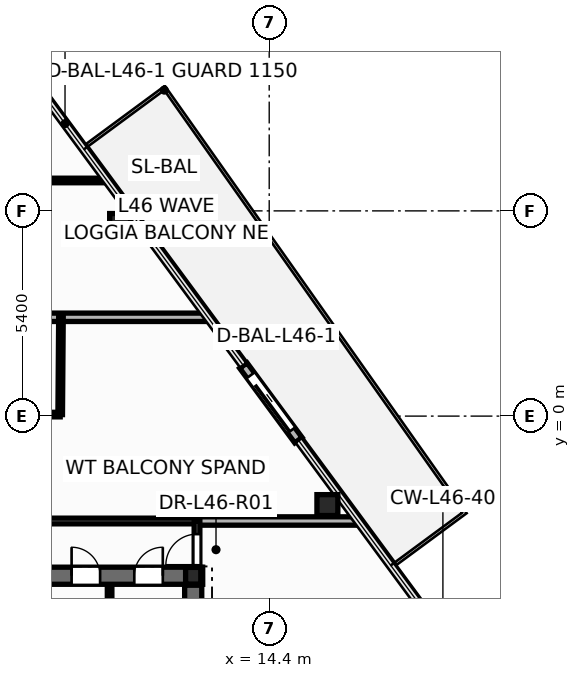
"""IFC4 building model, lengths in metres.
Left out: names, types, materials, properties, quantities, classifications, styles, units other than length and angle.
Written with IfcOpenShell. Run it as: python <this file> out.ifc"""

import sys

from ifc_helpers import new_model, si_unit, direction, frame, frame_2d, origin, origin_2d, place, context, subcontext, project, spatial, rectangle, hollow_circle, i_section, extrude, element, fill, save


model = new_model("IFC4")
c1 = context("Model", 3, precision=1e-05, world=origin(), true_north=direction((0.0, 1.0)))
c2 = subcontext(c1, "Body", "Model", "MODEL_VIEW")
j1 = project(units=[si_unit("LENGTHUNIT", "METRE"), si_unit("PLANEANGLEUNIT", "RADIAN")], contexts=[c1])
p1 = place(None, origin())
s1 = spatial("IfcSite", under=j1, at=p1, CompositionType="ELEMENT")
p2 = place(p1, origin())
s2 = spatial("IfcBuilding", under=s1, at=p2, CompositionType="ELEMENT")
p3 = place(p2, frame((0.0, 0.0, 178.5)))
s3 = spatial("IfcBuildingStorey", under=s2, at=p3, CompositionType="ELEMENT", Elevation=178.5)
for number, where, z_axis, x_axis in (
    (1, (15.931, -2.341, 0.0), (0.0, 0.0, 1.0), (1.0, 0.0, 0.0)),
    (2, (10.477, 5.055, 0.0), (0.0, 0.0, 1.0), (1.0, 0.0, 0.0)),
):
    element("IfcColumn", number, at=place(p3, frame(where, z_axis=z_axis, x_axis=x_axis)), inside=s3, PredefinedType="COLUMN", context=c2, shape_type="SweptSolid", body=[
        extrude(hollow_circle(Radius=0.275, WallThickness=0.024, at=origin_2d()), origin(), (0.0, 0.0, 1.0), 3.6),
    ])
p4 = place(p3, frame((12.4, -4.2, 0.0), z_axis=(0.0, 0.0, 1.0), x_axis=(1.0, 0.0, 0.0)))
e3 = element("IfcColumn", 3, at=p4, inside=s3, PredefinedType="COLUMN", context=c2, shape_type="SweptSolid", body=[
    extrude(i_section(OverallWidth=0.4, OverallDepth=0.44, WebThickness=0.028, FlangeThickness=0.04, at=origin_2d()), origin(), (0.0, 0.0, 1.0), 3.6),
])
p5 = place(p3, frame((15.168, -0.633, -0.015), z_axis=(0.0, 0.0, 1.0), x_axis=(-0.593448168385, 0.804872208142, 0.0)))
e4 = element("IfcWall", 4, at=p5, inside=s3, PredefinedType="STANDARD", context=c2, shape_type="SweptSolid", body=[
    extrude(rectangle(XDim=2.44, YDim=0.24, at=frame_2d((1.22, 0.0))), origin(), (0.0, 0.0, 1.0), 2.807),
])
p6 = place(p5, frame((0.32, 0.0, 0.015)))
e5 = element("IfcOpeningElement", 5, at=p6, cuts=e4, PredefinedType="OPENING", context=c2, shape_type="SweptSolid", body=[
    extrude(rectangle(XDim=1.806, YDim=2.204, at=frame_2d((0.9, 1.102))), frame((0.0, 0.13, 0.0), z_axis=(0.0, -1.0, 0.0), x_axis=(1.0, 0.0, 0.0)), (0.0, 0.0, 1.0), 0.26),
])
p7 = place(p3, frame((10.2, -5.52, 0.0), z_axis=(0.0, 0.0, 1.0), x_axis=(0.0, 1.0, 0.0)))
e6 = element("IfcWall", 6, at=p7, inside=s3, PredefinedType="PARTITIONING", context=c2, shape_type="SweptSolid", body=[
    extrude(rectangle(XDim=1.12, YDim=0.12, at=frame_2d((0.56, 0.0))), origin(), (0.0, 0.0, 1.0), 3.35),
])
p8 = place(p3, frame((-12.65, -4.2, 0.0), z_axis=(0.0, 0.0, 1.0), x_axis=(1.0, 0.0, 0.0)))
e7 = element("IfcWall", 7, at=p8, inside=s3, PredefinedType="SHEAR", context=c2, shape_type="SweptSolid", body=[
    extrude(rectangle(XDim=25.3, YDim=0.45, at=frame_2d((12.65, 0.0))), origin(), (0.0, 0.0, 1.0), 3.6),
])
p9 = place(p8, frame((1.85, 0.0, 0.0)))
e8 = element("IfcOpeningElement", 8, at=p9, cuts=e7, PredefinedType="OPENING", context=c2, shape_type="SweptSolid", body=[
    extrude(rectangle(XDim=0.756, YDim=2.054, at=frame_2d((0.375, 1.027))), frame((0.0, 0.235, 0.0), z_axis=(0.0, -1.0, 0.0), x_axis=(1.0, 0.0, 0.0)), (0.0, 0.0, 1.0), 0.47),
])
p10 = place(p8, frame((21.85, 0.0, 0.0)))
e9 = element("IfcOpeningElement", 9, at=p10, cuts=e7, PredefinedType="OPENING", context=c2, shape_type="SweptSolid", body=[
    extrude(rectangle(XDim=0.756, YDim=2.054, at=frame_2d((0.375, 1.027))), frame((0.0, 0.235, 0.0), z_axis=(0.0, -1.0, 0.0), x_axis=(1.0, 0.0, 0.0)), (0.0, 0.0, 1.0), 0.47),
])
p11 = place(p8, frame((23.5, 0.0, 0.0)))
e10 = element("IfcOpeningElement", 10, at=p11, cuts=e7, PredefinedType="OPENING", context=c2, shape_type="SweptSolid", body=[
    extrude(rectangle(XDim=0.756, YDim=2.054, at=frame_2d((0.375, 1.027))), frame((0.0, 0.235, 0.0), z_axis=(0.0, -1.0, 0.0), x_axis=(1.0, 0.0, 0.0)), (0.0, 0.0, 1.0), 0.47),
])
p12 = place(p8, frame((5.85, 0.0, 0.0)))
e11 = element("IfcOpeningElement", 11, at=p12, cuts=e7, PredefinedType="OPENING", context=c2, shape_type="SweptSolid", body=[
    extrude(rectangle(XDim=1.006, YDim=2.104, at=frame_2d((0.5, 1.052))), frame((0.0, 0.235, 0.0), z_axis=(0.0, -1.0, 0.0), x_axis=(1.0, 0.0, 0.0)), (0.0, 0.0, 1.0), 0.47),
])
p13 = place(p8, frame((10.35, 0.0, 0.0)))
e12 = element("IfcOpeningElement", 12, at=p13, cuts=e7, PredefinedType="OPENING", context=c2, shape_type="SweptSolid", body=[
    extrude(rectangle(XDim=1.406, YDim=2.154, at=frame_2d((0.7, 1.077))), frame((0.0, 0.235, 0.0), z_axis=(0.0, -1.0, 0.0), x_axis=(1.0, 0.0, 0.0)), (0.0, 0.0, 1.0), 0.47),
])
p14 = place(p8, frame((18.45, 0.0, 0.0)))
e13 = element("IfcOpeningElement", 13, at=p14, cuts=e7, PredefinedType="OPENING", context=c2, shape_type="SweptSolid", body=[
    extrude(rectangle(XDim=1.006, YDim=2.104, at=frame_2d((0.5, 1.052))), frame((0.0, 0.235, 0.0), z_axis=(0.0, -1.0, 0.0), x_axis=(1.0, 0.0, 0.0)), (0.0, 0.0, 1.0), 0.47),
])
p15 = place(p3, frame((12.4, -13.85, 0.0), z_axis=(0.0, 0.0, 1.0), x_axis=(0.0, 1.0, 0.0)))
e14 = element("IfcWall", 14, at=p15, inside=s3, PredefinedType="SHEAR", context=c2, shape_type="SweptSolid", body=[
    extrude(rectangle(XDim=9.4, YDim=0.45, at=frame_2d((4.7, 0.0))), origin(), (0.0, 0.0, 1.0), 3.6),
])
p16 = place(p3, frame((-0.64, 6.2, 0.0), z_axis=(0.0, 0.0, 1.0), x_axis=(1.0, 0.0, 0.0)))
e15 = element("IfcWall", 15, at=p16, inside=s3, PredefinedType="PARTITIONING", context=c2, shape_type="SweptSolid", body=[
    extrude(rectangle(XDim=10.769, YDim=0.12, at=frame_2d((5.385, 0.0))), origin(), (0.0, 0.0, 1.0), 2.325),
])
p17 = place(p3, frame((1.9, -2.76, 0.0), z_axis=(0.0, 0.0, 1.0), x_axis=(1.0, 0.0, 0.0)))
e16 = element("IfcWall", 16, at=p17, inside=s3, PredefinedType="PARTITIONING", context=c2, shape_type="SweptSolid", body=[
    extrude(rectangle(XDim=10.6, YDim=0.15, at=frame_2d((5.3, 0.0))), origin(), (0.0, 0.0, 1.0), 2.325),
])
p18 = place(p17, frame((0.399, 0.0, 0.0)))
e17 = element("IfcOpeningElement", 17, at=p18, cuts=e16, PredefinedType="OPENING", context=c2, shape_type="SweptSolid", body=[
    extrude(rectangle(XDim=0.956, YDim=2.104, at=frame_2d((0.475, 1.052))), frame((0.0, 0.085, 0.0), z_axis=(0.0, -1.0, 0.0), x_axis=(1.0, 0.0, 0.0)), (0.0, 0.0, 1.0), 0.17),
])
p19 = place(p3, frame((-0.64, 2.6, 0.0), z_axis=(0.0, 0.0, 1.0), x_axis=(1.0, 0.0, 0.0)))
e18 = element("IfcWall", 18, at=p19, inside=s3, PredefinedType="PARTITIONING", context=c2, shape_type="SweptSolid", body=[
    extrude(rectangle(XDim=13.424, YDim=0.22, at=frame_2d((6.712, 0.0))), origin(), (0.0, 0.0, 1.0), 2.325),
])
p20 = place(p3, frame((1.96, 0.04, 0.0), z_axis=(0.0, 0.0, 1.0), x_axis=(1.0, 0.0, 0.0)))
e19 = element("IfcWall", 19, at=p20, inside=s3, PredefinedType="PARTITIONING", context=c2, shape_type="SweptSolid", body=[
    extrude(rectangle(XDim=6.94, YDim=0.12, at=frame_2d((3.47, 0.0))), origin(), (0.0, 0.0, 1.0), 2.325),
])
p21 = place(p20, frame((0.359, 0.0, 0.0)))
e20 = element("IfcOpeningElement", 20, at=p21, cuts=e19, PredefinedType="OPENING", context=c2, shape_type="SweptSolid", body=[
    extrude(rectangle(XDim=0.926, YDim=2.104, at=frame_2d((0.46, 1.052))), frame((0.0, 0.07, 0.0), z_axis=(0.0, -1.0, 0.0), x_axis=(1.0, 0.0, 0.0)), (0.0, 0.0, 1.0), 0.14),
])
p22 = place(p3, frame((12.5, -2.76, 0.0), z_axis=(0.0, 0.0, 1.0), x_axis=(1.0, 0.0, 0.0)))
e21 = element("IfcWall", 21, at=p22, inside=s3, PredefinedType="PARTITIONING", context=c2, shape_type="SweptSolid", body=[
    extrude(rectangle(XDim=4.237, YDim=0.22, at=frame_2d((2.118, 0.0))), origin(), (0.0, 0.0, 1.0), 2.792),
])
p23 = place(p3, frame((8.9, 0.04, 0.0), z_axis=(0.0, 0.0, 1.0), x_axis=(0.00781971132, 0.99996942559, 0.0)))
e22 = element("IfcWall", 22, at=p23, inside=s3, PredefinedType="PARTITIONING", context=c2, shape_type="SweptSolid", body=[
    extrude(rectangle(XDim=2.56, YDim=0.12, at=frame_2d((1.28, 0.0))), origin(), (0.0, 0.0, 1.0), 2.625),
])
p24 = place(p3, frame((12.5, -4.24, 0.0), z_axis=(0.0, 0.0, 1.0), x_axis=(0.0, 1.0, 0.0)))
e23 = element("IfcWall", 23, at=p24, inside=s3, PredefinedType="PARTITIONING", context=c2, shape_type="SweptSolid", body=[
    extrude(rectangle(XDim=1.48, YDim=0.15, at=frame_2d((0.74, 0.0))), origin(), (0.0, 0.0, 1.0), 2.325),
])
p25 = place(p24, frame((0.315, 0.0, 0.0)))
e24 = element("IfcOpeningElement", 24, at=p25, cuts=e23, PredefinedType="OPENING", context=c2, shape_type="SweptSolid", body=[
    extrude(rectangle(XDim=0.826, YDim=2.104, at=frame_2d((0.41, 1.052))), frame((0.0, 0.085, 0.0), z_axis=(0.0, -1.0, 0.0), x_axis=(1.0, 0.0, 0.0)), (0.0, 0.0, 1.0), 0.17),
])
p26 = place(p6, origin())
e25 = element("IfcDoor", 25, at=p26, inside=s3, OperationType="SLIDING_TO_LEFT", PredefinedType="DOOR", context=c2, shape_type="SweptSolid", body=[
    extrude(rectangle(XDim=1.8, YDim=2.2, at=frame_2d((0.9, 1.1))), frame((0.0, 0.025, 0.0), z_axis=(0.0, -1.0, 0.0), x_axis=(1.0, 0.0, 0.0)), (0.0, 0.0, 1.0), 0.05),
])
fill(e5, e25)
p27 = place(p10, origin())
e26 = element("IfcDoor", 26, at=p27, inside=s3, OperationType="SINGLE_SWING_LEFT", PredefinedType="DOOR", context=c2, shape_type="SweptSolid", body=[
    extrude(rectangle(XDim=0.75, YDim=2.05, at=frame_2d((0.375, 1.025))), frame((0.0, 0.025, 0.0), z_axis=(0.0, -1.0, 0.0), x_axis=(1.0, 0.0, 0.0)), (0.0, 0.0, 1.0), 0.05),
])
fill(e9, e26)
p28 = place(p11, origin())
e27 = element("IfcDoor", 27, at=p28, inside=s3, OperationType="SINGLE_SWING_RIGHT", PredefinedType="DOOR", context=c2, shape_type="SweptSolid", body=[
    extrude(rectangle(XDim=0.75, YDim=2.05, at=frame_2d((0.375, 1.025))), frame((0.0, 0.025, 0.0), z_axis=(0.0, -1.0, 0.0), x_axis=(1.0, 0.0, 0.0)), (0.0, 0.0, 1.0), 0.05),
])
fill(e10, e27)
p29 = place(p25, origin())
e28 = element("IfcDoor", 28, at=p29, inside=s3, OperationType="SINGLE_SWING_LEFT", PredefinedType="DOOR", context=c2, shape_type="SweptSolid", body=[
    extrude(rectangle(XDim=0.82, YDim=2.1, at=frame_2d((0.41, 1.05))), frame((0.0, 0.025, 0.0), z_axis=(0.0, -1.0, 0.0), x_axis=(1.0, 0.0, 0.0)), (0.0, 0.0, 1.0), 0.05),
])
fill(e24, e28)
save(model, sys.argv[1])
